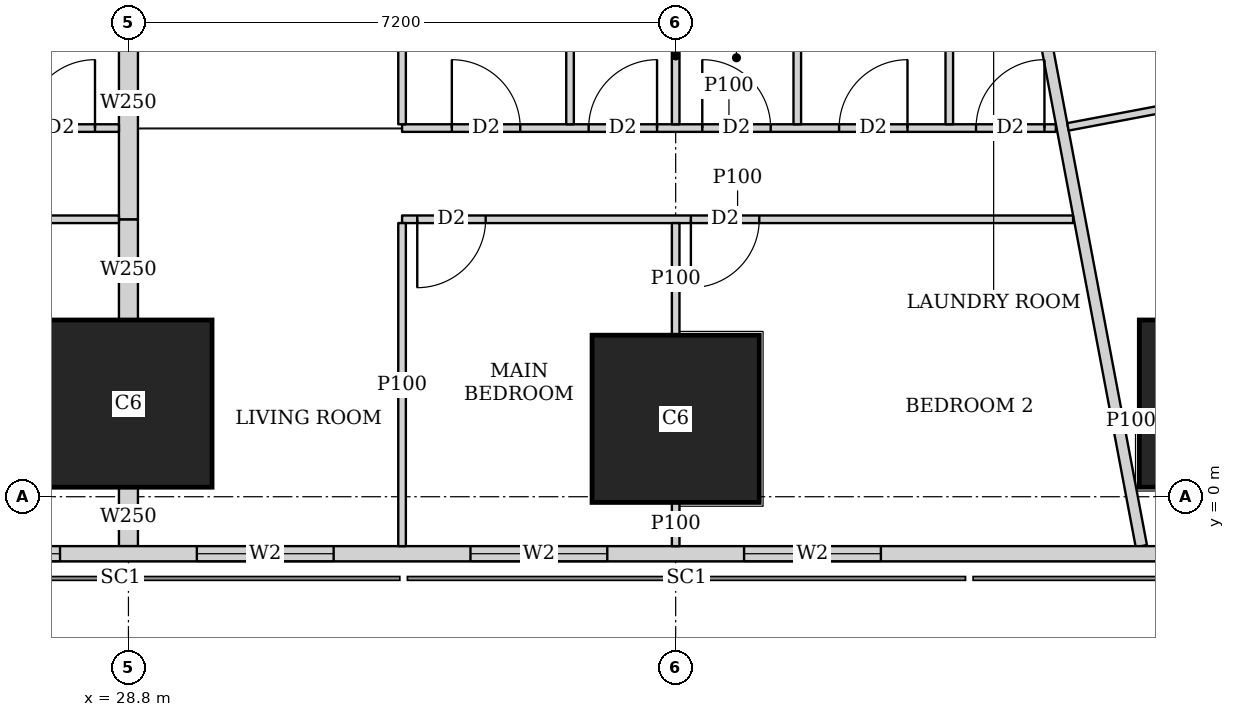
"""IFC4 building model, lengths in metres.
Left out: names, types, materials, properties, quantities, classifications, styles, units other than length and angle.
Written with IfcOpenShell. Run it as: python <this file> out.ifc"""

import sys

from ifc_helpers import new_model, si_unit, direction, frame, frame_2d, origin, origin_2d, place, context, subcontext, project, spatial, rectangle, extrude, element, fill, save


model = new_model("IFC4")
c1 = context("Model", 3, precision=1e-05, world=origin(), true_north=direction((0.0, 1.0)))
c2 = subcontext(c1, "Body", "Model", "MODEL_VIEW")
j1 = project(units=[si_unit("LENGTHUNIT", "METRE"), si_unit("PLANEANGLEUNIT", "RADIAN")], contexts=[c1])
p1 = place(None, origin())
s1 = spatial("IfcSite", under=j1, at=p1, CompositionType="ELEMENT")
p2 = place(p1, origin())
s2 = spatial("IfcBuilding", under=s1, at=p2, CompositionType="ELEMENT")
p3 = place(p2, frame((0.0, 0.0, 81.65)))
s3 = spatial("IfcBuildingStorey", under=s2, at=p3, CompositionType="ELEMENT", Elevation=81.65)
for number, where, z_axis, x_axis in (
    (1, (28.8, 1.225, 0.0), (0.0, 0.0, 1.0), (1.0, 0.0, 0.0)),
    (2, (36.0, 1.025, 0.0), (0.0, 0.0, 1.0), (1.0, 0.0, 0.0)),
    (3, (43.2, 1.225, 0.0), (0.0, 0.0, 1.0), (1.0, 0.0, 0.0)),
):
    element("IfcColumn", number, at=place(p3, frame(where, z_axis=z_axis, x_axis=x_axis)), inside=s3, PredefinedType="COLUMN", context=c2, shape_type="SweptSolid", body=[
        extrude(rectangle(XDim=2.2, YDim=2.2, at=origin_2d()), origin(), (0.0, 0.0, 1.0), 3.75),
    ])
p4 = place(p3, frame((2.163, -0.75, 0.0), z_axis=(0.0, 0.0, 1.0), x_axis=(1.0, 0.0, 0.0)))
e4 = element("IfcWall", 4, at=p4, inside=s3, PredefinedType="SOLIDWALL", context=c2, shape_type="SweptSolid", body=[
    extrude(rectangle(XDim=45.628, YDim=0.2, at=frame_2d((22.814, 0.0))), origin(), (0.0, 0.0, 1.0), 3.5),
])
p5 = place(p4, frame((9.537, 0.0, 0.9)))
e5 = element("IfcOpeningElement", 5, at=p5, cuts=e4, PredefinedType="OPENING", context=c2, shape_type="SweptSolid", body=[
    extrude(rectangle(XDim=1.8, YDim=1.5, at=frame_2d((0.9, 0.75))), frame((0.0, 0.11, 0.0), z_axis=(0.0, -1.0, 0.0), x_axis=(1.0, 0.0, 0.0)), (0.0, 0.0, 1.0), 0.22),
])
p6 = place(p4, frame((13.137, 0.0, 0.9)))
e6 = element("IfcOpeningElement", 6, at=p6, cuts=e4, PredefinedType="OPENING", context=c2, shape_type="SweptSolid", body=[
    extrude(rectangle(XDim=1.8, YDim=1.5, at=frame_2d((0.9, 0.75))), frame((0.0, 0.11, 0.0), z_axis=(0.0, -1.0, 0.0), x_axis=(1.0, 0.0, 0.0)), (0.0, 0.0, 1.0), 0.22),
])
p7 = place(p4, frame((16.737, 0.0, 0.9)))
e7 = element("IfcOpeningElement", 7, at=p7, cuts=e4, PredefinedType="OPENING", context=c2, shape_type="SweptSolid", body=[
    extrude(rectangle(XDim=1.8, YDim=1.5, at=frame_2d((0.9, 0.75))), frame((0.0, 0.11, 0.0), z_axis=(0.0, -1.0, 0.0), x_axis=(1.0, 0.0, 0.0)), (0.0, 0.0, 1.0), 0.22),
])
p8 = place(p4, frame((20.337, 0.0, 0.9)))
e8 = element("IfcOpeningElement", 8, at=p8, cuts=e4, PredefinedType="OPENING", context=c2, shape_type="SweptSolid", body=[
    extrude(rectangle(XDim=1.8, YDim=1.5, at=frame_2d((0.9, 0.75))), frame((0.0, 0.11, 0.0), z_axis=(0.0, -1.0, 0.0), x_axis=(1.0, 0.0, 0.0)), (0.0, 0.0, 1.0), 0.22),
])
p9 = place(p4, frame((23.937, 0.0, 0.9)))
e9 = element("IfcOpeningElement", 9, at=p9, cuts=e4, PredefinedType="OPENING", context=c2, shape_type="SweptSolid", body=[
    extrude(rectangle(XDim=1.8, YDim=1.5, at=frame_2d((0.9, 0.75))), frame((0.0, 0.11, 0.0), z_axis=(0.0, -1.0, 0.0), x_axis=(1.0, 0.0, 0.0)), (0.0, 0.0, 1.0), 0.22),
])
p10 = place(p4, frame((27.537, 0.0, 0.9)))
e10 = element("IfcOpeningElement", 10, at=p10, cuts=e4, PredefinedType="OPENING", context=c2, shape_type="SweptSolid", body=[
    extrude(rectangle(XDim=1.8, YDim=1.5, at=frame_2d((0.9, 0.75))), frame((0.0, 0.11, 0.0), z_axis=(0.0, -1.0, 0.0), x_axis=(1.0, 0.0, 0.0)), (0.0, 0.0, 1.0), 0.22),
])
p11 = place(p4, frame((31.137, 0.0, 0.9)))
e11 = element("IfcOpeningElement", 11, at=p11, cuts=e4, PredefinedType="OPENING", context=c2, shape_type="SweptSolid", body=[
    extrude(rectangle(XDim=1.8, YDim=1.5, at=frame_2d((0.9, 0.75))), frame((0.0, 0.11, 0.0), z_axis=(0.0, -1.0, 0.0), x_axis=(1.0, 0.0, 0.0)), (0.0, 0.0, 1.0), 0.22),
])
p12 = place(p4, frame((34.737, 0.0, 0.9)))
e12 = element("IfcOpeningElement", 12, at=p12, cuts=e4, PredefinedType="OPENING", context=c2, shape_type="SweptSolid", body=[
    extrude(rectangle(XDim=1.8, YDim=1.5, at=frame_2d((0.9, 0.75))), frame((0.0, 0.11, 0.0), z_axis=(0.0, -1.0, 0.0), x_axis=(1.0, 0.0, 0.0)), (0.0, 0.0, 1.0), 0.22),
])
p13 = place(p3, frame((33.382, 45.65, 0.0), z_axis=(0.0, 0.0, 1.0), x_axis=(0.185593544777, -0.982626600565, 0.0)))
e13 = element("IfcWall", 13, at=p13, inside=s3, PredefinedType="SOLIDWALL", context=c2, shape_type="SweptSolid", body=[
    extrude(rectangle(XDim=47.118, YDim=0.15, at=frame_2d((23.559, 0.0))), origin(), (0.0, 0.0, 1.0), 2.2),
])
p14 = place(p13, frame((19.054, 0.0, 0.0)))
e14 = element("IfcOpeningElement", 14, at=p14, cuts=e13, PredefinedType="OPENING", context=c2, shape_type="SweptSolid", body=[
    extrude(rectangle(XDim=1.0, YDim=2.1, at=frame_2d((0.5, 1.05))), frame((0.0, 0.085, 0.0), z_axis=(0.0, -1.0, 0.0), x_axis=(1.0, 0.0, 0.0)), (0.0, 0.0, 1.0), 0.17),
])
p15 = place(p13, frame((22.87, 0.0, 0.0)))
e15 = element("IfcOpeningElement", 15, at=p15, cuts=e13, PredefinedType="OPENING", context=c2, shape_type="SweptSolid", body=[
    extrude(rectangle(XDim=1.0, YDim=2.1, at=frame_2d((0.5, 1.05))), frame((0.0, 0.085, 0.0), z_axis=(0.0, -1.0, 0.0), x_axis=(1.0, 0.0, 0.0)), (0.0, 0.0, 1.0), 0.17),
])
p16 = place(p13, frame((33.833, 0.0, 0.0)))
e16 = element("IfcOpeningElement", 16, at=p16, cuts=e13, PredefinedType="OPENING", context=c2, shape_type="SweptSolid", body=[
    extrude(rectangle(XDim=1.0, YDim=2.1, at=frame_2d((0.5, 1.05))), frame((0.0, 0.085, 0.0), z_axis=(0.0, -1.0, 0.0), x_axis=(1.0, 0.0, 0.0)), (0.0, 0.0, 1.0), 0.17),
])
p17 = place(p3, frame((28.675, 3.65, 0.0), z_axis=(0.0, 0.0, 1.0), x_axis=(-1.0, 0.0, 0.0)))
e17 = element("IfcWall", 17, at=p17, inside=s3, PredefinedType="PARTITIONING", context=c2, shape_type="SweptSolid", body=[
    extrude(rectangle(XDim=10.675, YDim=0.1, at=frame_2d((5.337, 0.0))), origin(), (0.0, 0.0, 1.0), 3.5),
])
p18 = place(p17, frame((9.575, 0.0, 0.0)))
e18 = element("IfcOpeningElement", 18, at=p18, cuts=e17, PredefinedType="OPENING", context=c2, shape_type="SweptSolid", body=[
    extrude(rectangle(XDim=0.9, YDim=2.1, at=frame_2d((0.45, 1.05))), frame((0.0, 0.06, 0.0), z_axis=(0.0, -1.0, 0.0), x_axis=(1.0, 0.0, 0.0)), (0.0, 0.0, 1.0), 0.12),
])
p19 = place(p17, frame((5.975, 0.0, 0.0)))
e19 = element("IfcOpeningElement", 19, at=p19, cuts=e17, PredefinedType="OPENING", context=c2, shape_type="SweptSolid", body=[
    extrude(rectangle(XDim=0.9, YDim=2.1, at=frame_2d((0.45, 1.05))), frame((0.0, 0.06, 0.0), z_axis=(0.0, -1.0, 0.0), x_axis=(1.0, 0.0, 0.0)), (0.0, 0.0, 1.0), 0.12),
])
p20 = place(p17, frame((2.375, 0.0, 0.0)))
e20 = element("IfcOpeningElement", 20, at=p20, cuts=e17, PredefinedType="OPENING", context=c2, shape_type="SweptSolid", body=[
    extrude(rectangle(XDim=0.9, YDim=2.1, at=frame_2d((0.45, 1.05))), frame((0.0, 0.06, 0.0), z_axis=(0.0, -1.0, 0.0), x_axis=(1.0, 0.0, 0.0)), (0.0, 0.0, 1.0), 0.12),
])
p21 = place(p3, frame((28.675, 4.85, 0.0), z_axis=(0.0, 0.0, 1.0), x_axis=(-1.0, 0.0, 0.0)))
e21 = element("IfcWall", 21, at=p21, inside=s3, PredefinedType="PARTITIONING", context=c2, shape_type="SweptSolid", body=[
    extrude(rectangle(XDim=10.675, YDim=0.1, at=frame_2d((5.337, 0.0))), origin(), (0.0, 0.0, 1.0), 3.5),
])
p22 = place(p21, frame((9.12, 0.0, 0.0)))
e22 = element("IfcOpeningElement", 22, at=p22, cuts=e21, PredefinedType="OPENING", context=c2, shape_type="SweptSolid", body=[
    extrude(rectangle(XDim=0.9, YDim=2.1, at=frame_2d((0.45, 1.05))), frame((0.0, 0.06, 0.0), z_axis=(0.0, -1.0, 0.0), x_axis=(1.0, 0.0, 0.0)), (0.0, 0.0, 1.0), 0.12),
])
p23 = place(p21, frame((5.825, 0.0, 0.0)))
e23 = element("IfcOpeningElement", 23, at=p23, cuts=e21, PredefinedType="OPENING", context=c2, shape_type="SweptSolid", body=[
    extrude(rectangle(XDim=0.9, YDim=2.1, at=frame_2d((0.45, 1.05))), frame((0.0, 0.06, 0.0), z_axis=(0.0, -1.0, 0.0), x_axis=(1.0, 0.0, 0.0)), (0.0, 0.0, 1.0), 0.12),
])
p24 = place(p21, frame((2.115, 0.0, 0.0)))
e24 = element("IfcOpeningElement", 24, at=p24, cuts=e21, PredefinedType="OPENING", context=c2, shape_type="SweptSolid", body=[
    extrude(rectangle(XDim=0.9, YDim=2.1, at=frame_2d((0.45, 1.05))), frame((0.0, 0.06, 0.0), z_axis=(0.0, -1.0, 0.0), x_axis=(1.0, 0.0, 0.0)), (0.0, 0.0, 1.0), 0.12),
])
p25 = place(p21, frame((7.32, 0.0, 0.0)))
e25 = element("IfcOpeningElement", 25, at=p25, cuts=e21, PredefinedType="OPENING", context=c2, shape_type="SweptSolid", body=[
    extrude(rectangle(XDim=0.9, YDim=2.1, at=frame_2d((0.45, 1.05))), frame((0.0, 0.06, 0.0), z_axis=(0.0, -1.0, 0.0), x_axis=(1.0, 0.0, 0.0)), (0.0, 0.0, 1.0), 0.12),
])
p26 = place(p21, frame((4.025, 0.0, 0.0)))
e26 = element("IfcOpeningElement", 26, at=p26, cuts=e21, PredefinedType="OPENING", context=c2, shape_type="SweptSolid", body=[
    extrude(rectangle(XDim=0.9, YDim=2.1, at=frame_2d((0.45, 1.05))), frame((0.0, 0.06, 0.0), z_axis=(0.0, -1.0, 0.0), x_axis=(1.0, 0.0, 0.0)), (0.0, 0.0, 1.0), 0.12),
])
p27 = place(p21, frame((0.315, 0.0, 0.0)))
e27 = element("IfcOpeningElement", 27, at=p27, cuts=e21, PredefinedType="OPENING", context=c2, shape_type="SweptSolid", body=[
    extrude(rectangle(XDim=0.9, YDim=2.1, at=frame_2d((0.45, 1.05))), frame((0.0, 0.06, 0.0), z_axis=(0.0, -1.0, 0.0), x_axis=(1.0, 0.0, 0.0)), (0.0, 0.0, 1.0), 0.12),
])
p28 = place(p3, frame((41.229, 3.65, 0.0), z_axis=(0.0, 0.0, 1.0), x_axis=(-1.0, 0.0, 0.0)))
e28 = element("IfcWall", 28, at=p28, inside=s3, PredefinedType="PARTITIONING", context=c2, shape_type="SweptSolid", body=[
    extrude(rectangle(XDim=8.829, YDim=0.1, at=frame_2d((4.415, 0.0))), origin(), (0.0, 0.0, 1.0), 3.5),
])
p29 = place(p28, frame((7.729, 0.0, 0.0)))
e29 = element("IfcOpeningElement", 29, at=p29, cuts=e28, PredefinedType="OPENING", context=c2, shape_type="SweptSolid", body=[
    extrude(rectangle(XDim=0.9, YDim=2.1, at=frame_2d((0.45, 1.05))), frame((0.0, 0.06, 0.0), z_axis=(0.0, -1.0, 0.0), x_axis=(1.0, 0.0, 0.0)), (0.0, 0.0, 1.0), 0.12),
])
p30 = place(p28, frame((4.129, 0.0, 0.0)))
e30 = element("IfcOpeningElement", 30, at=p30, cuts=e28, PredefinedType="OPENING", context=c2, shape_type="SweptSolid", body=[
    extrude(rectangle(XDim=0.9, YDim=2.1, at=frame_2d((0.45, 1.05))), frame((0.0, 0.06, 0.0), z_axis=(0.0, -1.0, 0.0), x_axis=(1.0, 0.0, 0.0)), (0.0, 0.0, 1.0), 0.12),
])
p31 = place(p3, frame((41.002, 4.85, 0.0), z_axis=(0.0, 0.0, 1.0), x_axis=(-1.0, 0.0, 0.0)))
e31 = element("IfcWall", 31, at=p31, inside=s3, PredefinedType="PARTITIONING", context=c2, shape_type="SweptSolid", body=[
    extrude(rectangle(XDim=8.602, YDim=0.1, at=frame_2d((4.301, 0.0))), origin(), (0.0, 0.0, 1.0), 3.5),
])
p32 = place(p31, frame((7.047, 0.0, 0.0)))
e32 = element("IfcOpeningElement", 32, at=p32, cuts=e31, PredefinedType="OPENING", context=c2, shape_type="SweptSolid", body=[
    extrude(rectangle(XDim=0.9, YDim=2.1, at=frame_2d((0.45, 1.05))), frame((0.0, 0.06, 0.0), z_axis=(0.0, -1.0, 0.0), x_axis=(1.0, 0.0, 0.0)), (0.0, 0.0, 1.0), 0.12),
])
p33 = place(p31, frame((3.752, 0.0, 0.0)))
e33 = element("IfcOpeningElement", 33, at=p33, cuts=e31, PredefinedType="OPENING", context=c2, shape_type="SweptSolid", body=[
    extrude(rectangle(XDim=0.9, YDim=2.1, at=frame_2d((0.45, 1.05))), frame((0.0, 0.06, 0.0), z_axis=(0.0, -1.0, 0.0), x_axis=(1.0, 0.0, 0.0)), (0.0, 0.0, 1.0), 0.12),
])
p34 = place(p31, frame((0.15, 0.0, 0.0)))
e34 = element("IfcOpeningElement", 34, at=p34, cuts=e31, PredefinedType="OPENING", context=c2, shape_type="SweptSolid", body=[
    extrude(rectangle(XDim=0.9, YDim=2.1, at=frame_2d((0.45, 1.05))), frame((0.0, 0.06, 0.0), z_axis=(0.0, -1.0, 0.0), x_axis=(1.0, 0.0, 0.0)), (0.0, 0.0, 1.0), 0.12),
])
p35 = place(p31, frame((5.247, 0.0, 0.0)))
e35 = element("IfcOpeningElement", 35, at=p35, cuts=e31, PredefinedType="OPENING", context=c2, shape_type="SweptSolid", body=[
    extrude(rectangle(XDim=0.9, YDim=2.1, at=frame_2d((0.45, 1.05))), frame((0.0, 0.06, 0.0), z_axis=(0.0, -1.0, 0.0), x_axis=(1.0, 0.0, 0.0)), (0.0, 0.0, 1.0), 0.12),
])
p36 = place(p31, frame((1.952, 0.0, 0.0)))
e36 = element("IfcOpeningElement", 36, at=p36, cuts=e31, PredefinedType="OPENING", context=c2, shape_type="SweptSolid", body=[
    extrude(rectangle(XDim=0.9, YDim=2.1, at=frame_2d((0.45, 1.05))), frame((0.0, 0.06, 0.0), z_axis=(0.0, -1.0, 0.0), x_axis=(1.0, 0.0, 0.0)), (0.0, 0.0, 1.0), 0.12),
])
p37 = place(p3, frame((32.4, -0.65, 0.0), z_axis=(0.0, 0.0, 1.0), x_axis=(0.0, 1.0, 0.0)))
e37 = element("IfcWall", 37, at=p37, inside=s3, PredefinedType="PARTITIONING", context=c2, shape_type="SweptSolid", body=[
    extrude(rectangle(XDim=4.25, YDim=0.1, at=frame_2d((2.125, 0.0))), origin(), (0.0, 0.0, 1.0), 2.2),
])
p38 = place(p3, frame((36.0, -0.65, 0.0), z_axis=(0.0, 0.0, 1.0), x_axis=(0.0, 1.0, 0.0)))
e38 = element("IfcWall", 38, at=p38, inside=s3, PredefinedType="PARTITIONING", context=c2, shape_type="SweptSolid", body=[
    extrude(rectangle(XDim=0.574, YDim=0.1, at=frame_2d((0.287, 0.0))), origin(), (0.0, 0.0, 1.0), 3.5),
])
p39 = place(p3, frame((36.0, 2.126, 0.0), z_axis=(0.0, 0.0, 1.0), x_axis=(0.0, 1.0, 0.0)))
e39 = element("IfcWall", 39, at=p39, inside=s3, PredefinedType="PARTITIONING", context=c2, shape_type="SweptSolid", body=[
    extrude(rectangle(XDim=1.474, YDim=0.1, at=frame_2d((0.737, 0.0))), origin(), (0.0, 0.0, 1.0), 3.5),
])
p40 = place(p3, frame((32.4, 4.9, 0.0), z_axis=(0.0, 0.0, 1.0), x_axis=(0.0, 1.0, 0.0)))
e40 = element("IfcWall", 40, at=p40, inside=s3, PredefinedType="PARTITIONING", context=c2, shape_type="SweptSolid", body=[
    extrude(rectangle(XDim=3.275, YDim=0.1, at=frame_2d((1.638, 0.0))), origin(), (0.0, 0.0, 1.0), 3.5),
])
p41 = place(p3, frame((36.0, 4.9, 0.0), z_axis=(0.0, 0.0, 1.0), x_axis=(0.0, 1.0, 0.0)))
e41 = element("IfcWall", 41, at=p41, inside=s3, PredefinedType="PARTITIONING", context=c2, shape_type="SweptSolid", body=[
    extrude(rectangle(XDim=1.799, YDim=0.1, at=frame_2d((0.899, 0.0))), origin(), (0.0, 0.0, 1.0), 3.5),
])
for number, where, z_axis, x_axis in (
    (42, (39.6, 4.9, 0.0), (0.0, 0.0, 1.0), (0.0, 1.0, 0.0)),
    (43, (34.61, 4.9, 0.0), (0.0, 0.0, 1.0), (0.0, 1.0, 0.0)),
    (44, (37.6, 4.9, 0.0), (0.0, 0.0, 1.0), (0.0, 1.0, 0.0)),
):
    element("IfcWall", number, at=place(p3, frame(where, z_axis=z_axis, x_axis=x_axis)), inside=s3, PredefinedType="PARTITIONING", context=c2, shape_type="SweptSolid", body=[
        extrude(rectangle(XDim=3.275, YDim=0.1, at=frame_2d((1.638, 0.0))), origin(), (0.0, 0.0, 1.0), 3.5),
    ])
p42 = place(p3, frame((28.8, -0.65, 0.0), z_axis=(0.0, 0.0, 1.0), x_axis=(0.0, 1.0, 0.0)))
e45 = element("IfcWall", 45, at=p42, inside=s3, PredefinedType="SOLIDWALL", context=c2, shape_type="SweptSolid", body=[
    extrude(rectangle(XDim=0.774, YDim=0.25, at=frame_2d((0.387, 0.0))), origin(), (0.0, 0.0, 1.0), 3.5),
])
p43 = place(p3, frame((28.8, 2.326, 0.0), z_axis=(0.0, 0.0, 1.0), x_axis=(0.0, 1.0, 0.0)))
e46 = element("IfcWall", 46, at=p43, inside=s3, PredefinedType="SOLIDWALL", context=c2, shape_type="SweptSolid", body=[
    extrude(rectangle(XDim=1.324, YDim=0.25, at=frame_2d((0.662, 0.0))), origin(), (0.0, 0.0, 1.0), 3.5),
])
p44 = place(p3, frame((28.8, 3.65, 0.0), z_axis=(0.0, 0.0, 1.0), x_axis=(0.0, 1.0, 0.0)))
e47 = element("IfcWall", 47, at=p44, inside=s3, PredefinedType="SOLIDWALL", context=c2, shape_type="SweptSolid", body=[
    extrude(rectangle(XDim=3.049, YDim=0.25, at=frame_2d((1.524, 0.0))), origin(), (0.0, 0.0, 1.0), 3.5),
])
p45 = place(p3, frame((42.09, 1.016, 0.0), z_axis=(0.0, 0.0, 1.0), x_axis=(-0.982208563973, -0.187793335502, 0.0)))
e48 = element("IfcWall", 48, at=p45, inside=s3, PredefinedType="PARTITIONING", context=c2, shape_type="SweptSolid", body=[
    extrude(rectangle(XDim=0.198, YDim=0.1, at=frame_2d((0.099, 0.0))), origin(), (0.0, 0.0, 1.0), 2.05),
])
p46 = place(p3, frame((44.379, 5.474, 0.0), z_axis=(0.0, 0.0, 1.0), x_axis=(-0.982607026909, -0.185697147715, 0.0)))
e49 = element("IfcWall", 49, at=p46, inside=s3, PredefinedType="PARTITIONING", context=c2, shape_type="SweptSolid", body=[
    extrude(rectangle(XDim=3.275, YDim=0.1, at=frame_2d((1.637, 0.0))), origin(), (0.0, 0.0, 1.0), 3.5),
])
p47 = place(p9, origin())
e50 = element("IfcWindow", 50, at=p47, inside=s3, PartitioningType="SINGLE_PANEL", PredefinedType="WINDOW", context=c2, shape_type="SweptSolid", body=[
    extrude(rectangle(XDim=1.8, YDim=1.5, at=frame_2d((0.9, 0.75))), frame((0.0, 0.03, 0.0), z_axis=(0.0, -1.0, 0.0), x_axis=(1.0, 0.0, 0.0)), (0.0, 0.0, 1.0), 0.06),
])
fill(e9, e50)
p48 = place(p10, origin())
e51 = element("IfcWindow", 51, at=p48, inside=s3, PartitioningType="SINGLE_PANEL", PredefinedType="WINDOW", context=c2, shape_type="SweptSolid", body=[
    extrude(rectangle(XDim=1.8, YDim=1.5, at=frame_2d((0.9, 0.75))), frame((0.0, 0.03, 0.0), z_axis=(0.0, -1.0, 0.0), x_axis=(1.0, 0.0, 0.0)), (0.0, 0.0, 1.0), 0.06),
])
fill(e10, e51)
p49 = place(p11, origin())
e52 = element("IfcWindow", 52, at=p49, inside=s3, PartitioningType="SINGLE_PANEL", PredefinedType="WINDOW", context=c2, shape_type="SweptSolid", body=[
    extrude(rectangle(XDim=1.8, YDim=1.5, at=frame_2d((0.9, 0.75))), frame((0.0, 0.03, 0.0), z_axis=(0.0, -1.0, 0.0), x_axis=(1.0, 0.0, 0.0)), (0.0, 0.0, 1.0), 0.06),
])
fill(e11, e52)
p50 = place(p12, origin())
e53 = element("IfcWindow", 53, at=p50, inside=s3, PartitioningType="SINGLE_PANEL", PredefinedType="WINDOW", context=c2, shape_type="SweptSolid", body=[
    extrude(rectangle(XDim=1.8, YDim=1.5, at=frame_2d((0.9, 0.75))), frame((0.0, 0.03, 0.0), z_axis=(0.0, -1.0, 0.0), x_axis=(1.0, 0.0, 0.0)), (0.0, 0.0, 1.0), 0.06),
])
fill(e12, e53)
p51 = place(p27, origin())
e54 = element("IfcDoor", 54, at=p51, inside=s3, OperationType="SINGLE_SWING_RIGHT", PredefinedType="DOOR", context=c2, shape_type="SweptSolid", body=[
    extrude(rectangle(XDim=0.9, YDim=2.1, at=frame_2d((0.45, 1.05))), frame((0.0, 0.025, 0.0), z_axis=(0.0, -1.0, 0.0), x_axis=(1.0, 0.0, 0.0)), (0.0, 0.0, 1.0), 0.05),
])
fill(e27, e54)
p52 = place(p29, origin())
e55 = element("IfcDoor", 55, at=p52, inside=s3, OperationType="SINGLE_SWING_RIGHT", PredefinedType="DOOR", context=c2, shape_type="SweptSolid", body=[
    extrude(rectangle(XDim=0.9, YDim=2.1, at=frame_2d((0.45, 1.05))), frame((0.0, 0.025, 0.0), z_axis=(0.0, -1.0, 0.0), x_axis=(1.0, 0.0, 0.0)), (0.0, 0.0, 1.0), 0.05),
])
fill(e29, e55)
p53 = place(p30, origin())
e56 = element("IfcDoor", 56, at=p53, inside=s3, OperationType="SINGLE_SWING_RIGHT", PredefinedType="DOOR", context=c2, shape_type="SweptSolid", body=[
    extrude(rectangle(XDim=0.9, YDim=2.1, at=frame_2d((0.45, 1.05))), frame((0.0, 0.025, 0.0), z_axis=(0.0, -1.0, 0.0), x_axis=(1.0, 0.0, 0.0)), (0.0, 0.0, 1.0), 0.05),
])
fill(e30, e56)
p54 = place(p32, origin())
e57 = element("IfcDoor", 57, at=p54, inside=s3, OperationType="SINGLE_SWING_LEFT", PredefinedType="DOOR", context=c2, shape_type="SweptSolid", body=[
    extrude(rectangle(XDim=0.9, YDim=2.1, at=frame_2d((0.45, 1.05))), frame((0.0, 0.025, 0.0), z_axis=(0.0, -1.0, 0.0), x_axis=(1.0, 0.0, 0.0)), (0.0, 0.0, 1.0), 0.05),
])
fill(e32, e57)
p55 = place(p33, origin())
e58 = element("IfcDoor", 58, at=p55, inside=s3, OperationType="SINGLE_SWING_LEFT", PredefinedType="DOOR", context=c2, shape_type="SweptSolid", body=[
    extrude(rectangle(XDim=0.9, YDim=2.1, at=frame_2d((0.45, 1.05))), frame((0.0, 0.025, 0.0), z_axis=(0.0, -1.0, 0.0), x_axis=(1.0, 0.0, 0.0)), (0.0, 0.0, 1.0), 0.05),
])
fill(e33, e58)
p56 = place(p34, origin())
e59 = element("IfcDoor", 59, at=p56, inside=s3, OperationType="SINGLE_SWING_RIGHT", PredefinedType="DOOR", context=c2, shape_type="SweptSolid", body=[
    extrude(rectangle(XDim=0.9, YDim=2.1, at=frame_2d((0.45, 1.05))), frame((0.0, 0.025, 0.0), z_axis=(0.0, -1.0, 0.0), x_axis=(1.0, 0.0, 0.0)), (0.0, 0.0, 1.0), 0.05),
])
fill(e34, e59)
p57 = place(p35, origin())
e60 = element("IfcDoor", 60, at=p57, inside=s3, OperationType="SINGLE_SWING_RIGHT", PredefinedType="DOOR", context=c2, shape_type="SweptSolid", body=[
    extrude(rectangle(XDim=0.9, YDim=2.1, at=frame_2d((0.45, 1.05))), frame((0.0, 0.025, 0.0), z_axis=(0.0, -1.0, 0.0), x_axis=(1.0, 0.0, 0.0)), (0.0, 0.0, 1.0), 0.05),
])
fill(e35, e60)
p58 = place(p36, origin())
e61 = element("IfcDoor", 61, at=p58, inside=s3, OperationType="SINGLE_SWING_RIGHT", PredefinedType="DOOR", context=c2, shape_type="SweptSolid", body=[
    extrude(rectangle(XDim=0.9, YDim=2.1, at=frame_2d((0.45, 1.05))), frame((0.0, 0.025, 0.0), z_axis=(0.0, -1.0, 0.0), x_axis=(1.0, 0.0, 0.0)), (0.0, 0.0, 1.0), 0.05),
])
fill(e36, e61)
save(model, sys.argv[1])
